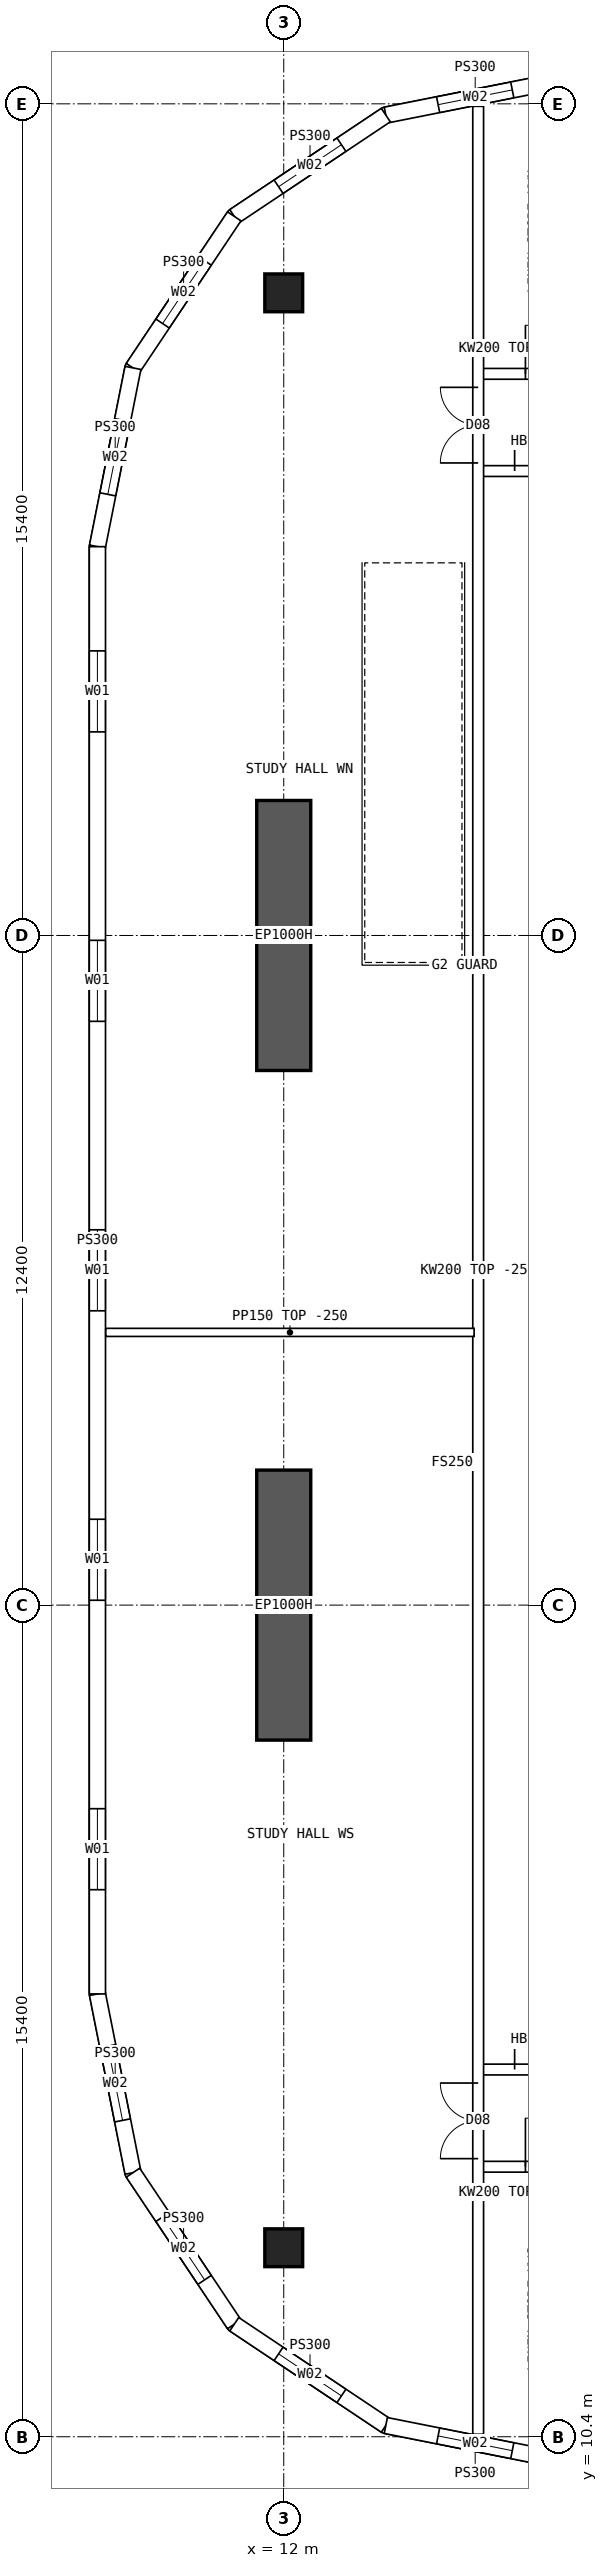
"""IFC4 building model, lengths in metres.
Left out: names, types, materials, properties, quantities, classifications, styles, units other than length and angle.
Written with IfcOpenShell. Run it as: python <this file> out.ifc"""

import sys

from ifc_helpers import new_model, si_unit, direction, frame, frame_2d, origin, origin_2d, place, context, subcontext, project, spatial, polyline, rectangle, hollow_rectangle, outline, extrude, element, fill, save


model = new_model("IFC4")
c1 = context("Model", 3, precision=1e-05, world=origin(), true_north=direction((0.0, 1.0)))
c2 = subcontext(c1, "Body", "Model", "MODEL_VIEW")
j1 = project(units=[si_unit("LENGTHUNIT", "METRE"), si_unit("PLANEANGLEUNIT", "RADIAN")], contexts=[c1])
p1 = place(None, origin())
s1 = spatial("IfcSite", under=j1, at=p1, CompositionType="ELEMENT")
p2 = place(p1, origin())
s2 = spatial("IfcBuilding", under=s1, at=p2, CompositionType="ELEMENT")
p3 = place(p2, frame((0.0, 0.0, 152.35)))
s3 = spatial("IfcBuildingStorey", under=s2, at=p3, CompositionType="ELEMENT", Elevation=152.35)
for number, where, z_axis, x_axis in (
    (1, (12.0, 13.9, 0.0), (0.0, 0.0, 1.0), (1.0, 0.0, 0.0)),
    (2, (12.0, 50.1, 0.0), (0.0, 0.0, 1.0), (1.0, 0.0, 0.0)),
):
    element("IfcColumn", number, at=place(p3, frame(where, z_axis=z_axis, x_axis=x_axis)), inside=s3, PredefinedType="COLUMN", context=c2, shape_type="SweptSolid", body=[
        extrude(hollow_rectangle(XDim=0.7, YDim=0.7, WallThickness=0.07, at=origin_2d()), origin(), (0.0, 0.0, 1.0), 3.75),
    ])
for number, where, z_axis, x_axis in (
    (3, (12.0, 23.3, 0.0), (0.0, 0.0, 1.0), (0.0, 1.0, 0.0)),
    (4, (12.0, 35.7, 0.0), (0.0, 0.0, 1.0), (0.0, 1.0, 0.0)),
):
    element("IfcWall", number, at=place(p3, frame(where, z_axis=z_axis, x_axis=x_axis)), inside=s3, PredefinedType="SHEAR", context=c2, shape_type="SweptSolid", body=[
        extrude(rectangle(XDim=5.0, YDim=1.0, at=frame_2d((2.5, 0.0))), origin(), (0.0, 0.0, 1.0), 3.75),
    ])
p4 = place(p3, frame((8.55, 45.4, 0.0), z_axis=(0.0, 0.0, 1.0), x_axis=(0.0, -1.0, 0.0)))
e5 = element("IfcWall", 5, at=p4, inside=s3, PredefinedType="SOLIDWALL", context=c2, shape_type="SweptSolid", body=[
    extrude(outline(polyline([(-0.015, -0.15), (26.815, -0.15), (26.785, 0.15), (0.015, 0.15), (-0.015, -0.15)])), origin(), (0.0, 0.0, 1.0), 3.5),
])
p5 = place(p4, frame((1.93, 0.0, 0.9)))
e6 = element("IfcOpeningElement", 6, at=p5, cuts=e5, PredefinedType="OPENING", context=c2, shape_type="SweptSolid", body=[
    extrude(rectangle(XDim=1.5, YDim=2.0, at=frame_2d((0.75, 1.0))), frame((0.0, 0.16, 0.0), z_axis=(0.0, -1.0, 0.0), x_axis=(1.0, 0.0, 0.0)), (0.0, 0.0, 1.0), 0.32),
])
p6 = place(p4, frame((7.29, 0.0, 0.9)))
e7 = element("IfcOpeningElement", 7, at=p6, cuts=e5, PredefinedType="OPENING", context=c2, shape_type="SweptSolid", body=[
    extrude(rectangle(XDim=1.5, YDim=2.0, at=frame_2d((0.75, 1.0))), frame((0.0, 0.16, 0.0), z_axis=(0.0, -1.0, 0.0), x_axis=(1.0, 0.0, 0.0)), (0.0, 0.0, 1.0), 0.32),
])
p7 = place(p4, frame((12.65, 0.0, 0.9)))
e8 = element("IfcOpeningElement", 8, at=p7, cuts=e5, PredefinedType="OPENING", context=c2, shape_type="SweptSolid", body=[
    extrude(rectangle(XDim=1.5, YDim=2.0, at=frame_2d((0.75, 1.0))), frame((0.0, 0.16, 0.0), z_axis=(0.0, -1.0, 0.0), x_axis=(1.0, 0.0, 0.0)), (0.0, 0.0, 1.0), 0.32),
])
p8 = place(p4, frame((18.01, 0.0, 0.9)))
e9 = element("IfcOpeningElement", 9, at=p8, cuts=e5, PredefinedType="OPENING", context=c2, shape_type="SweptSolid", body=[
    extrude(rectangle(XDim=1.5, YDim=2.0, at=frame_2d((0.75, 1.0))), frame((0.0, 0.16, 0.0), z_axis=(0.0, -1.0, 0.0), x_axis=(1.0, 0.0, 0.0)), (0.0, 0.0, 1.0), 0.32),
])
p9 = place(p4, frame((23.37, 0.0, 0.9)))
e10 = element("IfcOpeningElement", 10, at=p9, cuts=e5, PredefinedType="OPENING", context=c2, shape_type="SweptSolid", body=[
    extrude(rectangle(XDim=1.5, YDim=2.0, at=frame_2d((0.75, 1.0))), frame((0.0, 0.16, 0.0), z_axis=(0.0, -1.0, 0.0), x_axis=(1.0, 0.0, 0.0)), (0.0, 0.0, 1.0), 0.32),
])
p10 = place(p3, frame((17.2, 54.05, 0.0), z_axis=(0.0, 0.0, 1.0), x_axis=(-0.98078325777, -0.195100490205, 0.0)))
e11 = element("IfcWall", 11, at=p10, inside=s3, PredefinedType="SOLIDWALL", context=c2, shape_type="SweptSolid", body=[
    extrude(outline(polyline([(-0.03, -0.15), (3.405, -0.15), (3.345, 0.15), (0.03, 0.15), (-0.03, -0.15)])), origin(), (0.0, 0.0, 1.0), 3.5),
])
p11 = place(p10, frame((0.988, 0.0, 0.9)))
e12 = element("IfcOpeningElement", 12, at=p11, cuts=e11, PredefinedType="OPENING", context=c2, shape_type="SweptSolid", body=[
    extrude(rectangle(XDim=1.4, YDim=1.8, at=frame_2d((0.7, 0.9))), frame((0.0, 0.16, 0.0), z_axis=(0.0, -1.0, 0.0), x_axis=(1.0, 0.0, 0.0)), (0.0, 0.0, 1.0), 0.32),
])
p12 = place(p3, frame((13.89, 53.392, 0.0), z_axis=(0.0, 0.0, 1.0), x_axis=(-0.831493450887, -0.555534554399, 0.0)))
e13 = element("IfcWall", 13, at=p12, inside=s3, PredefinedType="SOLIDWALL", context=c2, shape_type="SweptSolid", body=[
    extrude(outline(polyline([(-0.03, -0.15), (3.405, -0.15), (3.345, 0.15), (0.03, 0.15), (-0.03, -0.15)])), origin(), (0.0, 0.0, 1.0), 3.5),
])
p13 = place(p12, frame((0.988, 0.0, 0.9)))
e14 = element("IfcOpeningElement", 14, at=p13, cuts=e13, PredefinedType="OPENING", context=c2, shape_type="SweptSolid", body=[
    extrude(rectangle(XDim=1.4, YDim=1.8, at=frame_2d((0.7, 0.9))), frame((0.0, 0.16, 0.0), z_axis=(0.0, -1.0, 0.0), x_axis=(1.0, 0.0, 0.0)), (0.0, 0.0, 1.0), 0.32),
])
p14 = place(p3, frame((11.083, 51.517, 0.0), z_axis=(0.0, 0.0, 1.0), x_axis=(-0.555534554399, -0.831493450887, 0.0)))
e15 = element("IfcWall", 15, at=p14, inside=s3, PredefinedType="SOLIDWALL", context=c2, shape_type="SweptSolid", body=[
    extrude(outline(polyline([(-0.03, -0.15), (3.405, -0.15), (3.345, 0.15), (0.03, 0.15), (-0.03, -0.15)])), origin(), (0.0, 0.0, 1.0), 3.5),
])
p15 = place(p14, frame((0.988, 0.0, 0.9)))
e16 = element("IfcOpeningElement", 16, at=p15, cuts=e15, PredefinedType="OPENING", context=c2, shape_type="SweptSolid", body=[
    extrude(rectangle(XDim=1.4, YDim=1.8, at=frame_2d((0.7, 0.9))), frame((0.0, 0.16, 0.0), z_axis=(0.0, -1.0, 0.0), x_axis=(1.0, 0.0, 0.0)), (0.0, 0.0, 1.0), 0.32),
])
p16 = place(p3, frame((9.208, 48.71, 0.0), z_axis=(0.0, 0.0, 1.0), x_axis=(-0.19508664885, -0.980786011034, 0.0)))
e17 = element("IfcWall", 17, at=p16, inside=s3, PredefinedType="SOLIDWALL", context=c2, shape_type="SweptSolid", body=[
    extrude(outline(polyline([(-0.03, -0.15), (3.39, -0.15), (3.36, 0.15), (0.03, 0.15), (-0.03, -0.15)])), origin(), (0.0, 0.0, 1.0), 3.5),
])
p17 = place(p16, frame((0.988, 0.0, 0.9)))
e18 = element("IfcOpeningElement", 18, at=p17, cuts=e17, PredefinedType="OPENING", context=c2, shape_type="SweptSolid", body=[
    extrude(rectangle(XDim=1.4, YDim=1.8, at=frame_2d((0.7, 0.9))), frame((0.0, 0.16, 0.0), z_axis=(0.0, -1.0, 0.0), x_axis=(1.0, 0.0, 0.0)), (0.0, 0.0, 1.0), 0.32),
])
p18 = place(p3, frame((8.55, 18.6, 0.0), z_axis=(0.0, 0.0, 1.0), x_axis=(0.19508664885, -0.980786011034, 0.0)))
e19 = element("IfcWall", 19, at=p18, inside=s3, PredefinedType="SOLIDWALL", context=c2, shape_type="SweptSolid", body=[
    extrude(outline(polyline([(-0.015, -0.15), (3.405, -0.15), (3.345, 0.15), (0.015, 0.15), (-0.015, -0.15)])), origin(), (0.0, 0.0, 1.0), 3.5),
])
p19 = place(p18, frame((0.988, 0.0, 0.9)))
e20 = element("IfcOpeningElement", 20, at=p19, cuts=e19, PredefinedType="OPENING", context=c2, shape_type="SweptSolid", body=[
    extrude(rectangle(XDim=1.4, YDim=1.8, at=frame_2d((0.7, 0.9))), frame((0.0, 0.16, 0.0), z_axis=(0.0, -1.0, 0.0), x_axis=(1.0, 0.0, 0.0)), (0.0, 0.0, 1.0), 0.32),
])
p20 = place(p3, frame((9.208, 15.29, 0.0), z_axis=(0.0, 0.0, 1.0), x_axis=(0.555534554399, -0.831493450887, 0.0)))
e21 = element("IfcWall", 21, at=p20, inside=s3, PredefinedType="SOLIDWALL", context=c2, shape_type="SweptSolid", body=[
    extrude(outline(polyline([(-0.03, -0.15), (3.405, -0.15), (3.345, 0.15), (0.03, 0.15), (-0.03, -0.15)])), origin(), (0.0, 0.0, 1.0), 3.5),
])
p21 = place(p20, frame((0.988, 0.0, 0.9)))
e22 = element("IfcOpeningElement", 22, at=p21, cuts=e21, PredefinedType="OPENING", context=c2, shape_type="SweptSolid", body=[
    extrude(rectangle(XDim=1.4, YDim=1.8, at=frame_2d((0.7, 0.9))), frame((0.0, 0.16, 0.0), z_axis=(0.0, -1.0, 0.0), x_axis=(1.0, 0.0, 0.0)), (0.0, 0.0, 1.0), 0.32),
])
p22 = place(p3, frame((11.083, 12.483, 0.0), z_axis=(0.0, 0.0, 1.0), x_axis=(0.831493450887, -0.555534554399, 0.0)))
e23 = element("IfcWall", 23, at=p22, inside=s3, PredefinedType="SOLIDWALL", context=c2, shape_type="SweptSolid", body=[
    extrude(outline(polyline([(-0.03, -0.15), (3.405, -0.15), (3.345, 0.15), (0.03, 0.15), (-0.03, -0.15)])), origin(), (0.0, 0.0, 1.0), 3.5),
])
p23 = place(p22, frame((0.988, 0.0, 0.9)))
e24 = element("IfcOpeningElement", 24, at=p23, cuts=e23, PredefinedType="OPENING", context=c2, shape_type="SweptSolid", body=[
    extrude(rectangle(XDim=1.4, YDim=1.8, at=frame_2d((0.7, 0.9))), frame((0.0, 0.16, 0.0), z_axis=(0.0, -1.0, 0.0), x_axis=(1.0, 0.0, 0.0)), (0.0, 0.0, 1.0), 0.32),
])
p24 = place(p3, frame((13.89, 10.608, 0.0), z_axis=(0.0, 0.0, 1.0), x_axis=(0.98078325777, -0.195100490205, 0.0)))
e25 = element("IfcWall", 25, at=p24, inside=s3, PredefinedType="SOLIDWALL", context=c2, shape_type="SweptSolid", body=[
    extrude(outline(polyline([(-0.03, -0.15), (3.405, -0.15), (3.345, 0.15), (0.03, 0.15), (-0.03, -0.15)])), origin(), (0.0, 0.0, 1.0), 3.5),
])
p25 = place(p24, frame((0.988, 0.0, 0.9)))
e26 = element("IfcOpeningElement", 26, at=p25, cuts=e25, PredefinedType="OPENING", context=c2, shape_type="SweptSolid", body=[
    extrude(rectangle(XDim=1.4, YDim=1.8, at=frame_2d((0.7, 0.9))), frame((0.0, 0.16, 0.0), z_axis=(0.0, -1.0, 0.0), x_axis=(1.0, 0.0, 0.0)), (0.0, 0.0, 1.0), 0.32),
])
p26 = place(p3, frame((15.6, 15.4, 0.0), z_axis=(0.0, 0.0, 1.0), x_axis=(1.0, 0.0, 0.0)))
e27 = element("IfcWall", 27, at=p26, inside=s3, PredefinedType="SOLIDWALL", context=c2, shape_type="SweptSolid", body=[
    extrude(rectangle(XDim=1.975, YDim=0.2, at=frame_2d((0.987, 0.0))), origin(), (0.0, 0.0, 1.0), 3.5),
])
p27 = place(p26, frame((0.875, 0.0, 0.0)))
e28 = element("IfcOpeningElement", 28, at=p27, cuts=e27, PredefinedType="OPENING", context=c2, shape_type="SweptSolid", body=[
    extrude(rectangle(XDim=0.9, YDim=2.1, at=frame_2d((0.45, 1.05))), frame((0.0, 0.11, 0.0), z_axis=(0.0, -1.0, 0.0), x_axis=(1.0, 0.0, 0.0)), (0.0, 0.0, 1.0), 0.22),
])
p28 = place(p3, frame((15.6, 17.2, 0.0), z_axis=(0.0, 0.0, 1.0), x_axis=(1.0, 0.0, 0.0)))
e29 = element("IfcWall", 29, at=p28, inside=s3, PredefinedType="SOLIDWALL", context=c2, shape_type="SweptSolid", body=[
    extrude(rectangle(XDim=1.975, YDim=0.2, at=frame_2d((0.987, 0.0))), origin(), (0.0, 0.0, 1.0), 3.5),
])
p29 = place(p28, frame((0.675, 0.0, 0.0)))
e30 = element("IfcOpeningElement", 30, at=p29, cuts=e29, PredefinedType="OPENING", context=c2, shape_type="SweptSolid", body=[
    extrude(rectangle(XDim=1.2, YDim=2.1, at=frame_2d((0.6, 1.05))), frame((0.0, 0.11, 0.0), z_axis=(0.0, -1.0, 0.0), x_axis=(1.0, 0.0, 0.0)), (0.0, 0.0, 1.0), 0.22),
])
p30 = place(p3, frame((15.6, 48.6, 0.0), z_axis=(0.0, 0.0, 1.0), x_axis=(1.0, 0.0, 0.0)))
e31 = element("IfcWall", 31, at=p30, inside=s3, PredefinedType="SOLIDWALL", context=c2, shape_type="SweptSolid", body=[
    extrude(rectangle(XDim=1.975, YDim=0.2, at=frame_2d((0.987, 0.0))), origin(), (0.0, 0.0, 1.0), 3.5),
])
p31 = place(p30, frame((0.875, 0.0, 0.0)))
e32 = element("IfcOpeningElement", 32, at=p31, cuts=e31, PredefinedType="OPENING", context=c2, shape_type="SweptSolid", body=[
    extrude(rectangle(XDim=0.9, YDim=2.1, at=frame_2d((0.45, 1.05))), frame((0.0, 0.11, 0.0), z_axis=(0.0, -1.0, 0.0), x_axis=(1.0, 0.0, 0.0)), (0.0, 0.0, 1.0), 0.22),
])
p32 = place(p3, frame((15.6, 46.8, 0.0), z_axis=(0.0, 0.0, 1.0), x_axis=(1.0, 0.0, 0.0)))
e33 = element("IfcWall", 33, at=p32, inside=s3, PredefinedType="SOLIDWALL", context=c2, shape_type="SweptSolid", body=[
    extrude(rectangle(XDim=1.975, YDim=0.2, at=frame_2d((0.987, 0.0))), origin(), (0.0, 0.0, 1.0), 3.5),
])
p33 = place(p32, frame((0.675, 0.0, 0.0)))
e34 = element("IfcOpeningElement", 34, at=p33, cuts=e33, PredefinedType="OPENING", context=c2, shape_type="SweptSolid", body=[
    extrude(rectangle(XDim=1.2, YDim=2.1, at=frame_2d((0.6, 1.05))), frame((0.0, 0.11, 0.0), z_axis=(0.0, -1.0, 0.0), x_axis=(1.0, 0.0, 0.0)), (0.0, 0.0, 1.0), 0.22),
])
p34 = place(p3, frame((8.705, 30.85, 0.0), z_axis=(0.0, 0.0, 1.0), x_axis=(1.0, 0.0, 0.0)))
e35 = element("IfcWall", 35, at=p34, inside=s3, PredefinedType="PARTITIONING", context=c2, shape_type="SweptSolid", body=[
    extrude(outline(polyline([(0.0, 0.0), (6.82, 0.0), (6.82, 3.5), (3.597, 3.5), (3.595, 3.05), (2.997, 3.05), (2.995, 3.5), (0.0, 3.5), (0.0, 0.0)])), frame((0.0, 0.075, 0.0), z_axis=(0.0, -1.0, 0.0), x_axis=(1.0, 0.0, 0.0)), (0.0, 0.0, 1.0), 0.15),
])
p35 = place(p3, frame((15.6, 10.446, 0.0), z_axis=(0.0, 0.0, 1.0), x_axis=(0.0, 1.0, 0.0)))
e36 = element("IfcWall", 36, at=p35, inside=s3, PredefinedType="SOLIDWALL", context=c2, shape_type="SweptSolid", body=[
    extrude(rectangle(XDim=43.107, YDim=0.2, at=frame_2d((21.554, 0.0))), origin(), (0.0, 0.0, 1.0), 3.5),
])
p36 = place(p35, frame((5.104, 0.0, 0.0)))
e37 = element("IfcOpeningElement", 37, at=p36, cuts=e36, PredefinedType="OPENING", context=c2, shape_type="SweptSolid", body=[
    extrude(rectangle(XDim=1.4, YDim=2.1, at=frame_2d((0.7, 1.05))), frame((0.0, 0.11, 0.0), z_axis=(0.0, -1.0, 0.0), x_axis=(1.0, 0.0, 0.0)), (0.0, 0.0, 1.0), 0.22),
])
p37 = place(p35, frame((36.504, 0.0, 0.0)))
e38 = element("IfcOpeningElement", 38, at=p37, cuts=e36, PredefinedType="OPENING", context=c2, shape_type="SweptSolid", body=[
    extrude(rectangle(XDim=1.4, YDim=2.1, at=frame_2d((0.7, 1.05))), frame((0.0, 0.11, 0.0), z_axis=(0.0, -1.0, 0.0), x_axis=(1.0, 0.0, 0.0)), (0.0, 0.0, 1.0), 0.22),
])
p38 = place(p5, origin())
e39 = element("IfcWindow", 39, at=p38, inside=s3, PartitioningType="SINGLE_PANEL", PredefinedType="WINDOW", context=c2, shape_type="SweptSolid", body=[
    extrude(rectangle(XDim=1.5, YDim=2.0, at=frame_2d((0.75, 1.0))), frame((0.0, 0.03, 0.0), z_axis=(0.0, -1.0, 0.0), x_axis=(1.0, 0.0, 0.0)), (0.0, 0.0, 1.0), 0.06),
])
fill(e6, e39)
p39 = place(p6, origin())
e40 = element("IfcWindow", 40, at=p39, inside=s3, PartitioningType="SINGLE_PANEL", PredefinedType="WINDOW", context=c2, shape_type="SweptSolid", body=[
    extrude(rectangle(XDim=1.5, YDim=2.0, at=frame_2d((0.75, 1.0))), frame((0.0, 0.03, 0.0), z_axis=(0.0, -1.0, 0.0), x_axis=(1.0, 0.0, 0.0)), (0.0, 0.0, 1.0), 0.06),
])
fill(e7, e40)
p40 = place(p7, origin())
e41 = element("IfcWindow", 41, at=p40, inside=s3, PartitioningType="SINGLE_PANEL", PredefinedType="WINDOW", context=c2, shape_type="SweptSolid", body=[
    extrude(rectangle(XDim=1.5, YDim=2.0, at=frame_2d((0.75, 1.0))), frame((0.0, 0.03, 0.0), z_axis=(0.0, -1.0, 0.0), x_axis=(1.0, 0.0, 0.0)), (0.0, 0.0, 1.0), 0.06),
])
fill(e8, e41)
p41 = place(p8, origin())
e42 = element("IfcWindow", 42, at=p41, inside=s3, PartitioningType="SINGLE_PANEL", PredefinedType="WINDOW", context=c2, shape_type="SweptSolid", body=[
    extrude(rectangle(XDim=1.5, YDim=2.0, at=frame_2d((0.75, 1.0))), frame((0.0, 0.03, 0.0), z_axis=(0.0, -1.0, 0.0), x_axis=(1.0, 0.0, 0.0)), (0.0, 0.0, 1.0), 0.06),
])
fill(e9, e42)
p42 = place(p9, origin())
e43 = element("IfcWindow", 43, at=p42, inside=s3, PartitioningType="SINGLE_PANEL", PredefinedType="WINDOW", context=c2, shape_type="SweptSolid", body=[
    extrude(rectangle(XDim=1.5, YDim=2.0, at=frame_2d((0.75, 1.0))), frame((0.0, 0.03, 0.0), z_axis=(0.0, -1.0, 0.0), x_axis=(1.0, 0.0, 0.0)), (0.0, 0.0, 1.0), 0.06),
])
fill(e10, e43)
p43 = place(p11, origin())
e44 = element("IfcWindow", 44, at=p43, inside=s3, PartitioningType="SINGLE_PANEL", PredefinedType="WINDOW", context=c2, shape_type="SweptSolid", body=[
    extrude(rectangle(XDim=1.4, YDim=1.8, at=frame_2d((0.7, 0.9))), frame((0.0, 0.03, 0.0), z_axis=(0.0, -1.0, 0.0), x_axis=(1.0, 0.0, 0.0)), (0.0, 0.0, 1.0), 0.06),
])
fill(e12, e44)
p44 = place(p13, origin())
e45 = element("IfcWindow", 45, at=p44, inside=s3, PartitioningType="SINGLE_PANEL", PredefinedType="WINDOW", context=c2, shape_type="SweptSolid", body=[
    extrude(rectangle(XDim=1.4, YDim=1.8, at=frame_2d((0.7, 0.9))), frame((0.0, 0.03, 0.0), z_axis=(0.0, -1.0, 0.0), x_axis=(1.0, 0.0, 0.0)), (0.0, 0.0, 1.0), 0.06),
])
fill(e14, e45)
p45 = place(p15, origin())
e46 = element("IfcWindow", 46, at=p45, inside=s3, PartitioningType="SINGLE_PANEL", PredefinedType="WINDOW", context=c2, shape_type="SweptSolid", body=[
    extrude(rectangle(XDim=1.4, YDim=1.8, at=frame_2d((0.7, 0.9))), frame((0.0, 0.03, 0.0), z_axis=(0.0, -1.0, 0.0), x_axis=(1.0, 0.0, 0.0)), (0.0, 0.0, 1.0), 0.06),
])
fill(e16, e46)
p46 = place(p17, origin())
e47 = element("IfcWindow", 47, at=p46, inside=s3, PartitioningType="SINGLE_PANEL", PredefinedType="WINDOW", context=c2, shape_type="SweptSolid", body=[
    extrude(rectangle(XDim=1.4, YDim=1.8, at=frame_2d((0.7, 0.9))), frame((0.0, 0.03, 0.0), z_axis=(0.0, -1.0, 0.0), x_axis=(1.0, 0.0, 0.0)), (0.0, 0.0, 1.0), 0.06),
])
fill(e18, e47)
p47 = place(p19, origin())
e48 = element("IfcWindow", 48, at=p47, inside=s3, PartitioningType="SINGLE_PANEL", PredefinedType="WINDOW", context=c2, shape_type="SweptSolid", body=[
    extrude(rectangle(XDim=1.4, YDim=1.8, at=frame_2d((0.7, 0.9))), frame((0.0, 0.03, 0.0), z_axis=(0.0, -1.0, 0.0), x_axis=(1.0, 0.0, 0.0)), (0.0, 0.0, 1.0), 0.06),
])
fill(e20, e48)
p48 = place(p21, origin())
e49 = element("IfcWindow", 49, at=p48, inside=s3, PartitioningType="SINGLE_PANEL", PredefinedType="WINDOW", context=c2, shape_type="SweptSolid", body=[
    extrude(rectangle(XDim=1.4, YDim=1.8, at=frame_2d((0.7, 0.9))), frame((0.0, 0.03, 0.0), z_axis=(0.0, -1.0, 0.0), x_axis=(1.0, 0.0, 0.0)), (0.0, 0.0, 1.0), 0.06),
])
fill(e22, e49)
p49 = place(p23, origin())
e50 = element("IfcWindow", 50, at=p49, inside=s3, PartitioningType="SINGLE_PANEL", PredefinedType="WINDOW", context=c2, shape_type="SweptSolid", body=[
    extrude(rectangle(XDim=1.4, YDim=1.8, at=frame_2d((0.7, 0.9))), frame((0.0, 0.03, 0.0), z_axis=(0.0, -1.0, 0.0), x_axis=(1.0, 0.0, 0.0)), (0.0, 0.0, 1.0), 0.06),
])
fill(e24, e50)
p50 = place(p25, origin())
e51 = element("IfcWindow", 51, at=p50, inside=s3, PartitioningType="SINGLE_PANEL", PredefinedType="WINDOW", context=c2, shape_type="SweptSolid", body=[
    extrude(rectangle(XDim=1.4, YDim=1.8, at=frame_2d((0.7, 0.9))), frame((0.0, 0.03, 0.0), z_axis=(0.0, -1.0, 0.0), x_axis=(1.0, 0.0, 0.0)), (0.0, 0.0, 1.0), 0.06),
])
fill(e26, e51)
p51 = place(p29, origin())
e52 = element("IfcDoor", 52, at=p51, inside=s3, OperationType="DOUBLE_DOOR_SINGLE_SWING", PredefinedType="DOOR", context=c2, shape_type="SweptSolid", body=[
    extrude(rectangle(XDim=1.2, YDim=2.1, at=frame_2d((0.6, 1.05))), frame((0.0, 0.025, 0.0), z_axis=(0.0, -1.0, 0.0), x_axis=(1.0, 0.0, 0.0)), (0.0, 0.0, 1.0), 0.05),
])
fill(e30, e52)
p52 = place(p33, origin())
e53 = element("IfcDoor", 53, at=p52, inside=s3, OperationType="DOUBLE_DOOR_SINGLE_SWING", PredefinedType="DOOR", context=c2, shape_type="SweptSolid", body=[
    extrude(rectangle(XDim=1.2, YDim=2.1, at=frame_2d((0.6, 1.05))), frame((0.0, 0.025, 0.0), z_axis=(0.0, -1.0, 0.0), x_axis=(1.0, 0.0, 0.0)), (0.0, 0.0, 1.0), 0.05),
])
fill(e34, e53)
p53 = place(p36, origin())
e54 = element("IfcDoor", 54, at=p53, inside=s3, OperationType="DOUBLE_DOOR_SINGLE_SWING", PredefinedType="DOOR", context=c2, shape_type="SweptSolid", body=[
    extrude(rectangle(XDim=1.4, YDim=2.1, at=frame_2d((0.7, 1.05))), frame((0.0, 0.025, 0.0), z_axis=(0.0, -1.0, 0.0), x_axis=(1.0, 0.0, 0.0)), (0.0, 0.0, 1.0), 0.05),
])
fill(e37, e54)
p54 = place(p37, origin())
e55 = element("IfcDoor", 55, at=p54, inside=s3, OperationType="DOUBLE_DOOR_SINGLE_SWING", PredefinedType="DOOR", context=c2, shape_type="SweptSolid", body=[
    extrude(rectangle(XDim=1.4, YDim=2.1, at=frame_2d((0.7, 1.05))), frame((0.0, 0.025, 0.0), z_axis=(0.0, -1.0, 0.0), x_axis=(1.0, 0.0, 0.0)), (0.0, 0.0, 1.0), 0.05),
])
fill(e38, e55)
p55 = place(p27, origin())
e56 = element("IfcDoor", 56, at=p55, inside=s3, OperationType="SINGLE_SWING_LEFT", PredefinedType="DOOR", context=c2, shape_type="SweptSolid", body=[
    extrude(rectangle(XDim=0.9, YDim=2.1, at=frame_2d((0.45, 1.05))), frame((0.0, 0.025, 0.0), z_axis=(0.0, -1.0, 0.0), x_axis=(1.0, 0.0, 0.0)), (0.0, 0.0, 1.0), 0.05),
])
fill(e28, e56)
p56 = place(p31, origin())
e57 = element("IfcDoor", 57, at=p56, inside=s3, OperationType="SINGLE_SWING_LEFT", PredefinedType="DOOR", context=c2, shape_type="SweptSolid", body=[
    extrude(rectangle(XDim=0.9, YDim=2.1, at=frame_2d((0.45, 1.05))), frame((0.0, 0.025, 0.0), z_axis=(0.0, -1.0, 0.0), x_axis=(1.0, 0.0, 0.0)), (0.0, 0.0, 1.0), 0.05),
])
fill(e32, e57)
save(model, sys.argv[1])
